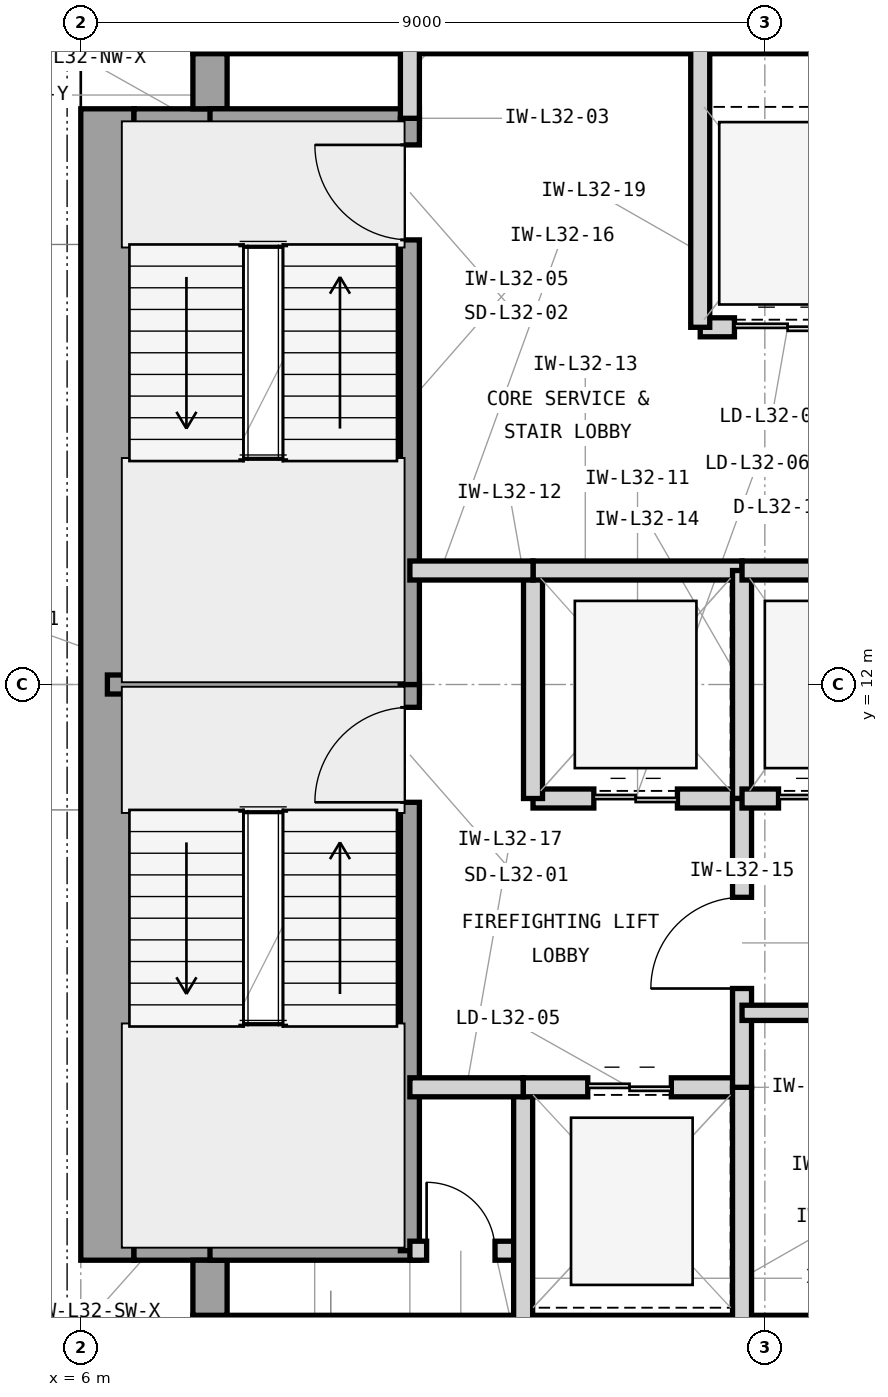
"""IFC4 building model, lengths in metres.
Left out: names, types, materials, properties, quantities, classifications, styles, units other than length and angle.
Written with IfcOpenShell. Run it as: python <this file> out.ifc"""

import sys

from ifc_helpers import new_model, si_unit, direction, frame, frame_2d, origin, place, context, subcontext, project, spatial, rectangle, extrude, element, fill, save


model = new_model("IFC4")
c1 = context("Model", 3, precision=1e-05, world=origin(), true_north=direction((0.0, 1.0)))
c2 = subcontext(c1, "Body", "Model", "MODEL_VIEW")
j1 = project(units=[si_unit("LENGTHUNIT", "METRE"), si_unit("PLANEANGLEUNIT", "RADIAN")], contexts=[c1])
p1 = place(None, origin())
s1 = spatial("IfcSite", under=j1, at=p1, CompositionType="ELEMENT")
p2 = place(p1, origin())
s2 = spatial("IfcBuilding", under=s1, at=p2, CompositionType="ELEMENT")
p3 = place(p2, frame((0.0, 0.0, 136.2)))
s3 = spatial("IfcBuildingStorey", under=s2, at=p3, CompositionType="ELEMENT", Elevation=136.2)
p4 = place(p3, frame((7.475, 3.35, 0.0), z_axis=(0.0, 0.0, 1.0), x_axis=(1.0, 0.0, 0.0)))
e1 = element("IfcWall", 1, at=p4, inside=s3, PredefinedType="SHEAR", context=c2, shape_type="SweptSolid", body=[
    extrude(rectangle(XDim=16.525, YDim=0.7, at=frame_2d((8.262, 0.0))), origin(), (0.0, 0.0, 1.0), 3.9),
])
p5 = place(p3, frame((6.35, 4.425, 0.0), z_axis=(0.0, 0.0, 1.0), x_axis=(0.0, 1.0, 0.0)))
e2 = element("IfcWall", 2, at=p5, inside=s3, PredefinedType="SHEAR", context=c2, shape_type="SweptSolid", body=[
    extrude(rectangle(XDim=15.15, YDim=0.7, at=frame_2d((7.575, 0.0))), origin(), (0.0, 0.0, 1.0), 3.9),
])
p6 = place(p3, frame((7.475, 20.65, 0.0), z_axis=(0.0, 0.0, 1.0), x_axis=(1.0, 0.0, 0.0)))
e3 = element("IfcWall", 3, at=p6, inside=s3, PredefinedType="SHEAR", context=c2, shape_type="SweptSolid", body=[
    extrude(rectangle(XDim=12.325, YDim=0.7, at=frame_2d((6.163, 0.0))), origin(), (0.0, 0.0, 1.0), 3.9),
])
p7 = place(p3, frame((6.7, 4.65, 0.0), z_axis=(0.0, 0.0, 1.0), x_axis=(1.0, 0.0, 0.0)))
e4 = element("IfcWall", 4, at=p7, inside=s3, PredefinedType="SHEAR", context=c2, shape_type="SweptSolid", body=[
    extrude(rectangle(XDim=1.225, YDim=0.45, at=frame_2d((0.613, 0.0))), origin(), (0.0, 0.0, 1.0), 3.9),
])
p8 = place(p3, frame((7.7, 3.7, 0.0), z_axis=(0.0, 0.0, 1.0), x_axis=(0.0, 1.0, 0.0)))
e5 = element("IfcWall", 5, at=p8, inside=s3, PredefinedType="SHEAR", context=c2, shape_type="SweptSolid", body=[
    extrude(rectangle(XDim=0.725, YDim=0.45, at=frame_2d((0.363, 0.0))), origin(), (0.0, 0.0, 1.0), 3.9),
])
p9 = place(p3, frame((6.7, 19.35, 0.0), z_axis=(0.0, 0.0, 1.0), x_axis=(1.0, 0.0, 0.0)))
e6 = element("IfcWall", 6, at=p9, inside=s3, PredefinedType="SHEAR", context=c2, shape_type="SweptSolid", body=[
    extrude(rectangle(XDim=1.225, YDim=0.45, at=frame_2d((0.613, 0.0))), origin(), (0.0, 0.0, 1.0), 3.9),
])
p10 = place(p3, frame((7.7, 19.575, 0.0), z_axis=(0.0, 0.0, 1.0), x_axis=(0.0, 1.0, 0.0)))
e7 = element("IfcWall", 7, at=p10, inside=s3, PredefinedType="SHEAR", context=c2, shape_type="SweptSolid", body=[
    extrude(rectangle(XDim=0.725, YDim=0.45, at=frame_2d((0.363, 0.0))), origin(), (0.0, 0.0, 1.0), 3.9),
])
p11 = place(p3, frame((6.35, 12.0, 0.0), z_axis=(0.0, 0.0, 1.0), x_axis=(1.0, 0.0, 0.0)))
e8 = element("IfcWall", 8, at=p11, inside=s3, PredefinedType="SHEAR", context=c2, shape_type="SweptSolid", body=[
    extrude(rectangle(XDim=4.105, YDim=0.25, at=frame_2d((2.052, 0.0))), origin(), (0.0, 0.0, 1.0), 3.9),
])
for number, where, z_axis, x_axis in (
    (9, (7.7, 4.55, 0.0), (0.0, 0.0, 1.0), (1.0, 0.0, 0.0)),
    (10, (7.7, 19.45, 0.0), (0.0, 0.0, 1.0), (1.0, 0.0, 0.0)),
):
    element("IfcWall", number, at=place(p3, frame(where, z_axis=z_axis, x_axis=x_axis)), inside=s3, PredefinedType="SHEAR", context=c2, shape_type="SweptSolid", body=[
        extrude(rectangle(XDim=2.755, YDim=0.25, at=frame_2d((1.377, 0.0))), origin(), (0.0, 0.0, 1.0), 3.9),
    ])
p12 = place(p3, frame((10.33, 4.55, 0.0), z_axis=(0.0, 0.0, 1.0), x_axis=(0.0, 1.0, 0.0)))
e11 = element("IfcWall", 11, at=p12, inside=s3, PredefinedType="SHEAR", context=c2, shape_type="SweptSolid", body=[
    extrude(rectangle(XDim=7.45, YDim=0.25, at=frame_2d((3.725, 0.0))), origin(), (0.0, 0.0, 1.0), 3.9),
])
p13 = place(p12, frame((5.9, 0.0, 0.0)))
e12 = element("IfcOpeningElement", 12, at=p13, cuts=e11, PredefinedType="OPENING", context=c2, shape_type="SweptSolid", body=[
    extrude(rectangle(XDim=1.25, YDim=2.2, at=frame_2d((0.625, 1.1))), frame((0.0, 0.135, 0.0), z_axis=(0.0, -1.0, 0.0), x_axis=(1.0, 0.0, 0.0)), (0.0, 0.0, 1.0), 0.27),
])
p14 = place(p3, frame((10.33, 12.0, 0.0), z_axis=(0.0, 0.0, 1.0), x_axis=(0.0, 1.0, 0.0)))
e13 = element("IfcWall", 13, at=p14, inside=s3, PredefinedType="SHEAR", context=c2, shape_type="SweptSolid", body=[
    extrude(rectangle(XDim=7.45, YDim=0.25, at=frame_2d((3.725, 0.0))), origin(), (0.0, 0.0, 1.0), 3.9),
])
p15 = place(p14, frame((5.85, 0.0, 0.0)))
e14 = element("IfcOpeningElement", 14, at=p15, cuts=e13, PredefinedType="OPENING", context=c2, shape_type="SweptSolid", body=[
    extrude(rectangle(XDim=1.25, YDim=2.2, at=frame_2d((0.625, 1.1))), frame((0.0, 0.135, 0.0), z_axis=(0.0, -1.0, 0.0), x_axis=(1.0, 0.0, 0.0)), (0.0, 0.0, 1.0), 0.27),
])
p16 = place(p3, frame((10.33, 4.55, 0.0), z_axis=(0.0, 0.0, 1.0), x_axis=(1.0, 0.0, 0.0)))
e15 = element("IfcWall", 15, at=p16, inside=s3, PredefinedType="PARTITIONING", context=c2, shape_type="SweptSolid", body=[
    extrude(rectangle(XDim=1.49, YDim=0.25, at=frame_2d((0.745, 0.0))), origin(), (0.0, 0.0, 1.0), 3.69),
])
p17 = place(p16, frame((0.22, 0.0, 0.0)))
e16 = element("IfcOpeningElement", 16, at=p17, cuts=e15, PredefinedType="OPENING", context=c2, shape_type="SweptSolid", body=[
    extrude(rectangle(XDim=0.9, YDim=2.1, at=frame_2d((0.45, 1.05))), frame((0.0, 0.135, 0.0), z_axis=(0.0, -1.0, 0.0), x_axis=(1.0, 0.0, 0.0)), (0.0, 0.0, 1.0), 0.27),
])
p18 = place(p3, frame((11.82, 3.35, 0.0), z_axis=(0.0, 0.0, 1.0), x_axis=(0.0, 1.0, 0.0)))
e17 = element("IfcWall", 17, at=p18, inside=s3, PredefinedType="PARTITIONING", context=c2, shape_type="SweptSolid", body=[
    extrude(rectangle(XDim=3.35, YDim=0.25, at=frame_2d((1.675, 0.0))), origin(), (0.0, 0.0, 1.0), 3.69),
])
p19 = place(p3, frame((10.33, 19.45, 0.0), z_axis=(0.0, 0.0, 1.0), x_axis=(0.0, 1.0, 0.0)))
e18 = element("IfcWall", 18, at=p19, inside=s3, PredefinedType="PARTITIONING", context=c2, shape_type="SweptSolid", body=[
    extrude(rectangle(XDim=1.2, YDim=0.25, at=frame_2d((0.6, 0.0))), origin(), (0.0, 0.0, 1.0), 2.994),
])
p20 = place(p3, frame((11.82, 6.7, 0.0), z_axis=(0.0, 0.0, 1.0), x_axis=(1.0, 0.0, 0.0)))
e19 = element("IfcWall", 19, at=p20, inside=s3, PredefinedType="PARTITIONING", context=c2, shape_type="SweptSolid", body=[
    extrude(rectangle(XDim=2.88, YDim=0.25, at=frame_2d((1.44, 0.0))), origin(), (0.0, 0.0, 1.0), 3.233),
])
p21 = place(p20, frame((0.85, 0.0, 0.0)))
e20 = element("IfcOpeningElement", 20, at=p21, cuts=e19, PredefinedType="OPENING", context=c2, shape_type="SweptSolid", body=[
    extrude(rectangle(XDim=1.1, YDim=2.25, at=frame_2d((0.55, 1.125))), frame((0.0, 0.135, 0.0), z_axis=(0.0, -1.0, 0.0), x_axis=(1.0, 0.0, 0.0)), (0.0, 0.0, 1.0), 0.27),
])
p22 = place(p3, frame((14.7, 3.35, 0.0), z_axis=(0.0, 0.0, 1.0), x_axis=(0.0, 1.0, 0.0)))
e21 = element("IfcWall", 21, at=p22, inside=s3, PredefinedType="PARTITIONING", context=c2, shape_type="SweptSolid", body=[
    extrude(rectangle(XDim=3.35, YDim=0.25, at=frame_2d((1.675, 0.0))), origin(), (0.0, 0.0, 1.0), 3.69),
])
p23 = place(p3, frame((11.95, 10.5, 0.0), z_axis=(0.0, 0.0, 1.0), x_axis=(1.0, 0.0, 0.0)))
e22 = element("IfcWall", 22, at=p23, inside=s3, PredefinedType="PARTITIONING", context=c2, shape_type="SweptSolid", body=[
    extrude(rectangle(XDim=2.75, YDim=0.25, at=frame_2d((1.375, 0.0))), origin(), (0.0, 0.0, 1.0), 3.233),
])
p24 = place(p23, frame((0.8, 0.0, 0.0)))
e23 = element("IfcOpeningElement", 23, at=p24, cuts=e22, PredefinedType="OPENING", context=c2, shape_type="SweptSolid", body=[
    extrude(rectangle(XDim=1.1, YDim=2.25, at=frame_2d((0.55, 1.125))), frame((0.0, 0.135, 0.0), z_axis=(0.0, -1.0, 0.0), x_axis=(1.0, 0.0, 0.0)), (0.0, 0.0, 1.0), 0.27),
])
p25 = place(p3, frame((11.95, 10.5, 0.0), z_axis=(0.0, 0.0, 1.0), x_axis=(0.0, 1.0, 0.0)))
e24 = element("IfcWall", 24, at=p25, inside=s3, PredefinedType="PARTITIONING", context=c2, shape_type="SweptSolid", body=[
    extrude(rectangle(XDim=3.0, YDim=0.25, at=frame_2d((1.5, 0.0))), origin(), (0.0, 0.0, 1.0), 3.69),
])
p26 = place(p3, frame((11.95, 13.5, 0.0), z_axis=(0.0, 0.0, 1.0), x_axis=(1.0, 0.0, 0.0)))
e25 = element("IfcWall", 25, at=p26, inside=s3, PredefinedType="PARTITIONING", context=c2, shape_type="SweptSolid", body=[
    extrude(rectangle(XDim=2.75, YDim=0.25, at=frame_2d((1.375, 0.0))), origin(), (0.0, 0.0, 1.0), 3.233),
])
p27 = place(p3, frame((14.7, 10.5, 0.0), z_axis=(0.0, 0.0, 1.0), x_axis=(0.0, 1.0, 0.0)))
e26 = element("IfcWall", 26, at=p27, inside=s3, PredefinedType="PARTITIONING", context=c2, shape_type="SweptSolid", body=[
    extrude(rectangle(XDim=3.0, YDim=0.25, at=frame_2d((1.5, 0.0))), origin(), (0.0, 0.0, 1.0), 3.69),
])
p28 = place(p3, frame((14.7, 6.7, 0.0), z_axis=(0.0, 0.0, 1.0), x_axis=(0.0, 1.0, 0.0)))
e27 = element("IfcWall", 27, at=p28, inside=s3, PredefinedType="PARTITIONING", context=c2, shape_type="SweptSolid", body=[
    extrude(rectangle(XDim=3.8, YDim=0.25, at=frame_2d((1.9, 0.0))), origin(), (0.0, 0.0, 1.0), 3.69),
])
p29 = place(p28, frame((1.3, 0.0, 0.0)))
e28 = element("IfcOpeningElement", 28, at=p29, cuts=e27, PredefinedType="OPENING", context=c2, shape_type="SweptSolid", body=[
    extrude(rectangle(XDim=1.2, YDim=2.2, at=frame_2d((0.6, 1.1))), frame((0.0, 0.135, 0.0), z_axis=(0.0, -1.0, 0.0), x_axis=(1.0, 0.0, 0.0)), (0.0, 0.0, 1.0), 0.27),
])
p30 = place(p3, frame((10.33, 13.5, 0.0), z_axis=(0.0, 0.0, 1.0), x_axis=(1.0, 0.0, 0.0)))
e29 = element("IfcWall", 29, at=p30, inside=s3, PredefinedType="PARTITIONING", context=c2, shape_type="SweptSolid", body=[
    extrude(rectangle(XDim=1.62, YDim=0.25, at=frame_2d((0.81, 0.0))), origin(), (0.0, 0.0, 1.0), 3.233),
])
p31 = place(p3, frame((10.33, 6.7, 0.0), z_axis=(0.0, 0.0, 1.0), x_axis=(1.0, 0.0, 0.0)))
e30 = element("IfcWall", 30, at=p31, inside=s3, PredefinedType="PARTITIONING", context=c2, shape_type="SweptSolid", body=[
    extrude(rectangle(XDim=1.49, YDim=0.25, at=frame_2d((0.745, 0.0))), origin(), (0.0, 0.0, 1.0), 3.233),
])
p32 = place(p3, frame((14.15, 16.7, 0.0), z_axis=(0.0, 0.0, 1.0), x_axis=(1.0, 0.0, 0.0)))
e31 = element("IfcWall", 31, at=p32, inside=s3, PredefinedType="PARTITIONING", context=c2, shape_type="SweptSolid", body=[
    extrude(rectangle(XDim=2.3, YDim=0.25, at=frame_2d((1.15, 0.0))), origin(), (0.0, 0.0, 1.0), 3.233),
])
p33 = place(p32, frame((0.45, 0.0, 0.0)))
e32 = element("IfcOpeningElement", 32, at=p33, cuts=e31, PredefinedType="OPENING", context=c2, shape_type="SweptSolid", body=[
    extrude(rectangle(XDim=1.4, YDim=2.35, at=frame_2d((0.7, 1.175))), frame((0.0, 0.135, 0.0), z_axis=(0.0, -1.0, 0.0), x_axis=(1.0, 0.0, 0.0)), (0.0, 0.0, 1.0), 0.27),
])
p34 = place(p3, frame((14.15, 16.7, 0.0), z_axis=(0.0, 0.0, 1.0), x_axis=(0.0, 1.0, 0.0)))
e33 = element("IfcWall", 33, at=p34, inside=s3, PredefinedType="PARTITIONING", context=c2, shape_type="SweptSolid", body=[
    extrude(rectangle(XDim=3.95, YDim=0.25, at=frame_2d((1.975, 0.0))), origin(), (0.0, 0.0, 1.0), 3.69),
])
p35 = place(p3, frame((14.7, 7.68, 0.0), z_axis=(0.0, 0.0, 1.0), x_axis=(1.0, 0.0, 0.0)))
e34 = element("IfcWall", 34, at=p35, inside=s3, PredefinedType="PARTITIONING", context=c2, shape_type="SweptSolid", body=[
    extrude(rectangle(XDim=2.85, YDim=0.2, at=frame_2d((1.425, 0.0))), origin(), (0.0, 0.0, 1.0), 3.69),
])
p36 = place(p35, frame((0.925, 0.0, 0.0)))
e35 = element("IfcOpeningElement", 35, at=p36, cuts=e34, PredefinedType="OPENING", context=c2, shape_type="SweptSolid", body=[
    extrude(rectangle(XDim=1.0, YDim=2.15, at=frame_2d((0.5, 1.075))), frame((0.0, 0.11, 0.0), z_axis=(0.0, -1.0, 0.0), x_axis=(1.0, 0.0, 0.0)), (0.0, 0.0, 1.0), 0.22),
])
p37 = place(p3, frame((14.7, 10.5, 0.0), z_axis=(0.0, 0.0, 1.0), x_axis=(1.0, 0.0, 0.0)))
e36 = element("IfcWall", 36, at=p37, inside=s3, PredefinedType="PARTITIONING", context=c2, shape_type="SweptSolid", body=[
    extrude(rectangle(XDim=2.15, YDim=0.25, at=frame_2d((1.075, 0.0))), origin(), (0.0, 0.0, 1.0), 3.233),
])
p38 = place(p37, frame((0.48, 0.0, 0.0)))
e37 = element("IfcOpeningElement", 37, at=p38, cuts=e36, PredefinedType="OPENING", context=c2, shape_type="SweptSolid", body=[
    extrude(rectangle(XDim=1.15, YDim=2.25, at=frame_2d((0.575, 1.125))), frame((0.0, 0.135, 0.0), z_axis=(0.0, -1.0, 0.0), x_axis=(1.0, 0.0, 0.0)), (0.0, 0.0, 1.0), 0.27),
])
p39 = place(p3, frame((14.7, 13.5, 0.0), z_axis=(0.0, 0.0, 1.0), x_axis=(1.0, 0.0, 0.0)))
e38 = element("IfcWall", 38, at=p39, inside=s3, PredefinedType="PARTITIONING", context=c2, shape_type="SweptSolid", body=[
    extrude(rectangle(XDim=8.95, YDim=0.25, at=frame_2d((4.475, 0.0))), origin(), (0.0, 0.0, 1.0), 3.233),
])
p40 = place(p13, origin())
e39 = element("IfcDoor", 39, at=p40, inside=s3, OperationType="SINGLE_SWING_LEFT", PredefinedType="DOOR", context=c2, shape_type="SweptSolid", body=[
    extrude(rectangle(XDim=1.25, YDim=2.2, at=frame_2d((0.625, 1.1))), frame((0.0, 0.025, 0.0), z_axis=(0.0, -1.0, 0.0), x_axis=(1.0, 0.0, 0.0)), (0.0, 0.0, 1.0), 0.05),
])
fill(e12, e39)
p41 = place(p15, origin())
e40 = element("IfcDoor", 40, at=p41, inside=s3, OperationType="SINGLE_SWING_RIGHT", PredefinedType="DOOR", context=c2, shape_type="SweptSolid", body=[
    extrude(rectangle(XDim=1.25, YDim=2.2, at=frame_2d((0.625, 1.1))), frame((0.0, 0.025, 0.0), z_axis=(0.0, -1.0, 0.0), x_axis=(1.0, 0.0, 0.0)), (0.0, 0.0, 1.0), 0.05),
])
fill(e14, e40)
p42 = place(p17, origin())
e41 = element("IfcDoor", 41, at=p42, inside=s3, OperationType="SINGLE_SWING_LEFT", PredefinedType="TRAPDOOR", context=c2, shape_type="SweptSolid", body=[
    extrude(rectangle(XDim=0.9, YDim=2.1, at=frame_2d((0.45, 1.05))), frame((0.0, 0.025, 0.0), z_axis=(0.0, -1.0, 0.0), x_axis=(1.0, 0.0, 0.0)), (0.0, 0.0, 1.0), 0.05),
])
fill(e16, e41)
p43 = place(p21, origin())
e42 = element("IfcDoor", 42, at=p43, inside=s3, OperationType="DOUBLE_DOOR_SLIDING", PredefinedType="DOOR", context=c2, shape_type="SweptSolid", body=[
    extrude(rectangle(XDim=1.1, YDim=2.25, at=frame_2d((0.55, 1.125))), frame((0.0, 0.025, 0.0), z_axis=(0.0, -1.0, 0.0), x_axis=(1.0, 0.0, 0.0)), (0.0, 0.0, 1.0), 0.05),
])
fill(e20, e42)
p44 = place(p24, origin())
e43 = element("IfcDoor", 43, at=p44, inside=s3, OperationType="DOUBLE_DOOR_SLIDING", PredefinedType="DOOR", context=c2, shape_type="SweptSolid", body=[
    extrude(rectangle(XDim=1.1, YDim=2.25, at=frame_2d((0.55, 1.125))), frame((0.0, 0.025, 0.0), z_axis=(0.0, -1.0, 0.0), x_axis=(1.0, 0.0, 0.0)), (0.0, 0.0, 1.0), 0.05),
])
fill(e23, e43)
p45 = place(p29, origin())
e44 = element("IfcDoor", 44, at=p45, inside=s3, OperationType="SINGLE_SWING_LEFT", PredefinedType="DOOR", context=c2, shape_type="SweptSolid", body=[
    extrude(rectangle(XDim=1.2, YDim=2.2, at=frame_2d((0.6, 1.1))), frame((0.0, 0.025, 0.0), z_axis=(0.0, -1.0, 0.0), x_axis=(1.0, 0.0, 0.0)), (0.0, 0.0, 1.0), 0.05),
])
fill(e28, e44)
p46 = place(p33, origin())
e45 = element("IfcDoor", 45, at=p46, inside=s3, OperationType="DOUBLE_DOOR_SLIDING", PredefinedType="DOOR", context=c2, shape_type="SweptSolid", body=[
    extrude(rectangle(XDim=1.4, YDim=2.35, at=frame_2d((0.7, 1.175))), frame((0.0, 0.025, 0.0), z_axis=(0.0, -1.0, 0.0), x_axis=(1.0, 0.0, 0.0)), (0.0, 0.0, 1.0), 0.05),
])
fill(e32, e45)
p47 = place(p38, origin())
e46 = element("IfcDoor", 46, at=p47, inside=s3, OperationType="DOUBLE_DOOR_SLIDING", PredefinedType="DOOR", context=c2, shape_type="SweptSolid", body=[
    extrude(rectangle(XDim=1.15, YDim=2.25, at=frame_2d((0.575, 1.125))), frame((0.0, 0.025, 0.0), z_axis=(0.0, -1.0, 0.0), x_axis=(1.0, 0.0, 0.0)), (0.0, 0.0, 1.0), 0.05),
])
fill(e37, e46)
save(model, sys.argv[1])
